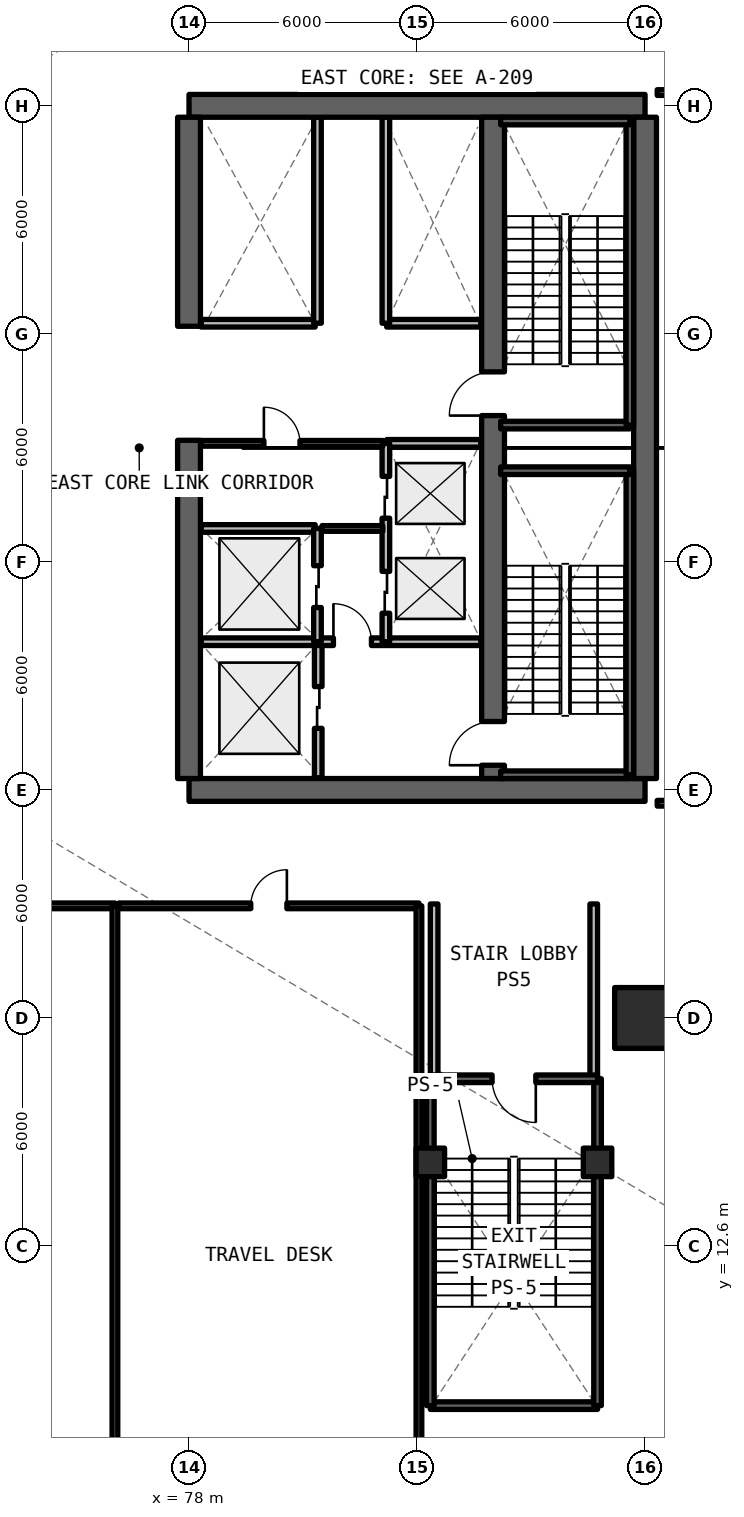
"""IFC4 building model, lengths in metres.
Left out: names, types, materials, properties, quantities, classifications, styles, units other than length and angle.
Written with IfcOpenShell. Run it as: python <this file> out.ifc"""

import sys

from ifc_helpers import new_model, si_unit, direction, frame, frame_2d, origin, origin_2d, place, context, subcontext, project, spatial, rectangle, extrude, element, fill, save


model = new_model("IFC4")
c1 = context("Model", 3, precision=1e-05, world=origin(), true_north=direction((0.0, 1.0)))
c2 = subcontext(c1, "Body", "Model", "MODEL_VIEW")
j1 = project(units=[si_unit("LENGTHUNIT", "METRE"), si_unit("PLANEANGLEUNIT", "RADIAN")], contexts=[c1])
p1 = place(None, origin())
s1 = spatial("IfcSite", under=j1, at=p1, CompositionType="ELEMENT")
p2 = place(p1, origin())
s2 = spatial("IfcBuilding", under=s1, at=p2, CompositionType="ELEMENT")
p3 = place(p2, frame((0.0, 0.0, 19.47)))
s3 = spatial("IfcBuildingStorey", under=s2, at=p3, CompositionType="ELEMENT", Elevation=19.47)
for number, where, z_axis, x_axis in (
    (1, (78.0, 24.6, 0.0), (0.0, 0.0, 1.0), (1.0, 0.0, 0.0)),
    (2, (90.0, 42.6, 0.0), (0.0, 0.0, 1.0), (-1.0, 0.0, 0.0)),
):
    element("IfcWall", number, at=place(p3, frame(where, z_axis=z_axis, x_axis=x_axis)), inside=s3, PredefinedType="SHEAR", context=c2, shape_type="SweptSolid", body=[
        extrude(rectangle(XDim=12.0, YDim=0.6, at=frame_2d((6.0, 0.0))), origin(), (0.0, 0.0, 1.0), 4.62),
    ])
p4 = place(p3, frame((90.0, 24.9, 0.0), z_axis=(0.0, 0.0, 1.0), x_axis=(0.0, 1.0, 0.0)))
e3 = element("IfcWall", 3, at=p4, inside=s3, PredefinedType="SHEAR", context=c2, shape_type="SweptSolid", body=[
    extrude(rectangle(XDim=17.4, YDim=0.6, at=frame_2d((8.7, 0.0))), origin(), (0.0, 0.0, 1.0), 4.62),
])
p5 = place(p3, frame((78.0, 24.9, 0.0), z_axis=(0.0, 0.0, 1.0), x_axis=(0.0, 1.0, 0.0)))
e4 = element("IfcWall", 4, at=p5, inside=s3, PredefinedType="SHEAR", context=c2, shape_type="SweptSolid", body=[
    extrude(rectangle(XDim=8.9, YDim=0.6, at=frame_2d((4.45, 0.0))), origin(), (0.0, 0.0, 1.0), 4.62),
])
p6 = place(p3, frame((78.0, 36.8, 0.0), z_axis=(0.0, 0.0, 1.0), x_axis=(0.0, 1.0, 0.0)))
e5 = element("IfcWall", 5, at=p6, inside=s3, PredefinedType="SHEAR", context=c2, shape_type="SweptSolid", body=[
    extrude(rectangle(XDim=5.5, YDim=0.6, at=frame_2d((2.75, 0.0))), origin(), (0.0, 0.0, 1.0), 4.62),
])
p7 = place(p3, frame((86.0, 24.9, 0.0), z_axis=(0.0, 0.0, 1.0), x_axis=(0.0, 1.0, 0.0)))
e6 = element("IfcWall", 6, at=p7, inside=s3, PredefinedType="SHEAR", context=c2, shape_type="SweptSolid", body=[
    extrude(rectangle(XDim=17.4, YDim=0.6, at=frame_2d((8.7, 0.0))), origin(), (0.0, 0.0, 1.0), 4.62),
])
p8 = place(p7, frame((0.35, 0.0, 0.0)))
e7 = element("IfcOpeningElement", 7, at=p8, cuts=e6, PredefinedType="OPENING", context=c2, shape_type="SweptSolid", body=[
    extrude(rectangle(XDim=1.15, YDim=2.15, at=frame_2d((0.575, 1.075))), frame((0.0, 0.31, 0.0), z_axis=(0.0, -1.0, 0.0), x_axis=(1.0, 0.0, 0.0)), (0.0, 0.0, 1.0), 0.62),
])
p9 = place(p7, frame((9.55, 0.0, 0.0)))
e8 = element("IfcOpeningElement", 8, at=p9, cuts=e6, PredefinedType="OPENING", context=c2, shape_type="SweptSolid", body=[
    extrude(rectangle(XDim=1.15, YDim=2.15, at=frame_2d((0.575, 1.075))), frame((0.0, 0.31, 0.0), z_axis=(0.0, -1.0, 0.0), x_axis=(1.0, 0.0, 0.0)), (0.0, 0.0, 1.0), 0.62),
])
p10 = place(p3, frame((90.0, 18.6, 0.0), z_axis=(0.0, 0.0, 1.0), x_axis=(1.0, 0.0, 0.0)))
e9 = element("IfcColumn", 9, at=p10, inside=s3, PredefinedType="COLUMN", context=c2, shape_type="SweptSolid", body=[
    extrude(rectangle(XDim=1.6, YDim=1.6, at=origin_2d()), origin(), (0.0, 0.0, 1.0), 4.62),
])
for number, where, z_axis, x_axis in (
    (10, (84.35, 14.8, 0.0), (0.0, 0.0, 1.0), (1.0, 0.0, 0.0)),
    (11, (88.75, 14.8, 0.0), (0.0, 0.0, 1.0), (1.0, 0.0, 0.0)),
):
    element("IfcColumn", number, at=place(p3, frame(where, z_axis=z_axis, x_axis=x_axis)), inside=s3, PredefinedType="COLUMN", context=c2, shape_type="SweptSolid", body=[
        extrude(rectangle(XDim=0.75, YDim=0.75, at=origin_2d()), origin(), (0.0, 0.0, 1.0), 4.27),
    ])
p11 = place(p3, frame((81.4, 24.92, 0.0), z_axis=(0.0, 0.0, 1.0), x_axis=(0.0, 1.0, 0.0)))
e12 = element("IfcWall", 12, at=p11, inside=s3, PredefinedType="SOLIDWALL", context=c2, shape_type="SweptSolid", body=[
    extrude(rectangle(XDim=3.58, YDim=0.2, at=frame_2d((1.79, 0.0))), origin(), (0.0, 0.0, 1.0), 3.49),
])
p12 = place(p11, frame((1.3, 0.0, 0.0)))
e13 = element("IfcOpeningElement", 13, at=p12, cuts=e12, PredefinedType="OPENING", context=c2, shape_type="SweptSolid", body=[
    extrude(rectangle(XDim=1.1, YDim=2.2, at=frame_2d((0.55, 1.1))), frame((0.0, 0.11, 0.0), z_axis=(0.0, -1.0, 0.0), x_axis=(1.0, 0.0, 0.0)), (0.0, 0.0, 1.0), 0.22),
])
p13 = place(p3, frame((78.32, 28.5, 0.0), z_axis=(0.0, 0.0, 1.0), x_axis=(1.0, 0.0, 0.0)))
e14 = element("IfcWall", 14, at=p13, inside=s3, PredefinedType="SOLIDWALL", context=c2, shape_type="SweptSolid", body=[
    extrude(rectangle(XDim=7.36, YDim=0.2, at=frame_2d((3.68, 0.0))), origin(), (0.0, 0.0, 1.0), 3.49),
])
p14 = place(p13, frame((3.48, 0.0, 0.0)))
e15 = element("IfcOpeningElement", 15, at=p14, cuts=e14, PredefinedType="OPENING", context=c2, shape_type="SweptSolid", body=[
    extrude(rectangle(XDim=1.0, YDim=2.15, at=frame_2d((0.5, 1.075))), frame((0.0, 0.11, 0.0), z_axis=(0.0, -1.0, 0.0), x_axis=(1.0, 0.0, 0.0)), (0.0, 0.0, 1.0), 0.22),
])
p15 = place(p3, frame((83.2, 33.72, 0.0), z_axis=(0.0, 0.0, 1.0), x_axis=(1.0, 0.0, 0.0)))
e16 = element("IfcWall", 16, at=p15, inside=s3, PredefinedType="SOLIDWALL", context=c2, shape_type="SweptSolid", body=[
    extrude(rectangle(XDim=2.48, YDim=0.2, at=frame_2d((1.24, 0.0))), origin(), (0.0, 0.0, 1.0), 3.49),
])
p16 = place(p3, frame((83.18, 28.5, 0.0), z_axis=(0.0, 0.0, 1.0), x_axis=(0.0, 1.0, 0.0)))
e17 = element("IfcWall", 17, at=p16, inside=s3, PredefinedType="SOLIDWALL", context=c2, shape_type="SweptSolid", body=[
    extrude(rectangle(XDim=5.22, YDim=0.2, at=frame_2d((2.61, 0.0))), origin(), (0.0, 0.0, 1.0), 3.49),
])
p17 = place(p16, frame((0.75, 0.0, 0.0)))
e18 = element("IfcOpeningElement", 18, at=p17, cuts=e17, PredefinedType="OPENING", context=c2, shape_type="SweptSolid", body=[
    extrude(rectangle(XDim=1.1, YDim=2.2, at=frame_2d((0.55, 1.1))), frame((0.0, 0.11, 0.0), z_axis=(0.0, -1.0, 0.0), x_axis=(1.0, 0.0, 0.0)), (0.0, 0.0, 1.0), 0.22),
])
p18 = place(p16, frame((3.25, 0.0, 0.0)))
e19 = element("IfcOpeningElement", 19, at=p18, cuts=e17, PredefinedType="OPENING", context=c2, shape_type="SweptSolid", body=[
    extrude(rectangle(XDim=1.1, YDim=2.2, at=frame_2d((0.55, 1.1))), frame((0.0, 0.11, 0.0), z_axis=(0.0, -1.0, 0.0), x_axis=(1.0, 0.0, 0.0)), (0.0, 0.0, 1.0), 0.22),
])
p19 = place(p3, frame((78.32, 31.48, 0.0), z_axis=(0.0, 0.0, 1.0), x_axis=(1.0, 0.0, 0.0)))
e20 = element("IfcWall", 20, at=p19, inside=s3, PredefinedType="SOLIDWALL", context=c2, shape_type="SweptSolid", body=[
    extrude(rectangle(XDim=3.0, YDim=0.2, at=frame_2d((1.5, 0.0))), origin(), (0.0, 0.0, 1.0), 3.49),
])
p20 = place(p3, frame((81.38, 28.5, 0.0), z_axis=(0.0, 0.0, 1.0), x_axis=(0.0, 1.0, 0.0)))
e21 = element("IfcWall", 21, at=p20, inside=s3, PredefinedType="SOLIDWALL", context=c2, shape_type="SweptSolid", body=[
    extrude(rectangle(XDim=2.98, YDim=0.2, at=frame_2d((1.49, 0.0))), origin(), (0.0, 0.0, 1.0), 3.49),
])
p21 = place(p20, frame((0.9, 0.0, 0.0)))
e22 = element("IfcOpeningElement", 22, at=p21, cuts=e21, PredefinedType="OPENING", context=c2, shape_type="SweptSolid", body=[
    extrude(rectangle(XDim=1.1, YDim=2.2, at=frame_2d((0.55, 1.1))), frame((0.0, 0.11, 0.0), z_axis=(0.0, -1.0, 0.0), x_axis=(1.0, 0.0, 0.0)), (0.0, 0.0, 1.0), 0.22),
])
p22 = place(p3, frame((81.5, 31.48, 0.0), z_axis=(0.0, 0.0, 1.0), x_axis=(1.0, 0.0, 0.0)))
e23 = element("IfcWall", 23, at=p22, inside=s3, PredefinedType="SOLIDWALL", context=c2, shape_type="SweptSolid", body=[
    extrude(rectangle(XDim=1.6, YDim=0.15, at=frame_2d((0.8, 0.0))), origin(), (0.0, 0.0, 1.0), 3.49),
])
p23 = place(p3, frame((78.32, 33.72, 0.0), z_axis=(0.0, 0.0, 1.0), x_axis=(1.0, 0.0, 0.0)))
e24 = element("IfcWall", 24, at=p23, inside=s3, PredefinedType="SOLIDWALL", context=c2, shape_type="SweptSolid", body=[
    extrude(rectangle(XDim=4.78, YDim=0.15, at=frame_2d((2.39, 0.0))), origin(), (0.0, 0.0, 1.0), 3.49),
])
p24 = place(p23, frame((1.65, 0.0, 0.0)))
e25 = element("IfcOpeningElement", 25, at=p24, cuts=e24, PredefinedType="OPENING", context=c2, shape_type="SweptSolid", body=[
    extrude(rectangle(XDim=0.95, YDim=2.15, at=frame_2d((0.475, 1.075))), frame((0.0, 0.085, 0.0), z_axis=(0.0, -1.0, 0.0), x_axis=(1.0, 0.0, 0.0)), (0.0, 0.0, 1.0), 0.17),
])
p25 = place(p3, frame((83.2, 36.88, 0.0), z_axis=(0.0, 0.0, 1.0), x_axis=(1.0, 0.0, 0.0)))
e26 = element("IfcWall", 26, at=p25, inside=s3, PredefinedType="SOLIDWALL", context=c2, shape_type="SweptSolid", body=[
    extrude(rectangle(XDim=2.48, YDim=0.2, at=frame_2d((1.24, 0.0))), origin(), (0.0, 0.0, 1.0), 3.49),
])
p26 = place(p3, frame((83.18, 36.88, 0.0), z_axis=(0.0, 0.0, 1.0), x_axis=(0.0, 1.0, 0.0)))
e27 = element("IfcWall", 27, at=p26, inside=s3, PredefinedType="SOLIDWALL", context=c2, shape_type="SweptSolid", body=[
    extrude(rectangle(XDim=5.42, YDim=0.2, at=frame_2d((2.71, 0.0))), origin(), (0.0, 0.0, 1.0), 3.49),
])
p27 = place(p3, frame((78.32, 36.88, 0.0), z_axis=(0.0, 0.0, 1.0), x_axis=(1.0, 0.0, 0.0)))
e28 = element("IfcWall", 28, at=p27, inside=s3, PredefinedType="SOLIDWALL", context=c2, shape_type="SweptSolid", body=[
    extrude(rectangle(XDim=3.0, YDim=0.2, at=frame_2d((1.5, 0.0))), origin(), (0.0, 0.0, 1.0), 3.49),
])
p28 = place(p3, frame((81.38, 36.88, 0.0), z_axis=(0.0, 0.0, 1.0), x_axis=(0.0, 1.0, 0.0)))
e29 = element("IfcWall", 29, at=p28, inside=s3, PredefinedType="SOLIDWALL", context=c2, shape_type="SweptSolid", body=[
    extrude(rectangle(XDim=5.42, YDim=0.2, at=frame_2d((2.71, 0.0))), origin(), (0.0, 0.0, 1.0), 3.49),
])
for number, where, z_axis, x_axis in (
    (30, (84.45, 17.0, 0.0), (0.0, 0.0, 1.0), (0.0, 1.0, 0.0)),
    (31, (88.65, 17.0, 0.0), (0.0, 0.0, 1.0), (0.0, 1.0, 0.0)),
):
    element("IfcWall", number, at=place(p3, frame(where, z_axis=z_axis, x_axis=x_axis)), inside=s3, PredefinedType="SOLIDWALL", context=c2, shape_type="SweptSolid", body=[
        extrude(rectangle(XDim=4.6, YDim=0.2, at=frame_2d((2.3, 0.0))), origin(), (0.0, 0.0, 1.0), 3.49),
    ])
p29 = place(p3, frame((67.15, 21.55, 0.0), z_axis=(0.0, 0.0, 1.0), x_axis=(1.0, 0.0, 0.0)))
e32 = element("IfcWall", 32, at=p29, inside=s3, PredefinedType="SOLIDWALL", context=c2, shape_type="SweptSolid", body=[
    extrude(rectangle(XDim=8.9, YDim=0.15, at=frame_2d((4.45, 0.0))), origin(), (0.0, 0.0, 1.0), 3.49),
])
p30 = place(p29, frame((3.975, 0.0, 0.0)))
e33 = element("IfcOpeningElement", 33, at=p30, cuts=e32, PredefinedType="OPENING", context=c2, shape_type="SweptSolid", body=[
    extrude(rectangle(XDim=0.95, YDim=2.15, at=frame_2d((0.475, 1.075))), frame((0.0, 0.085, 0.0), z_axis=(0.0, -1.0, 0.0), x_axis=(1.0, 0.0, 0.0)), (0.0, 0.0, 1.0), 0.17),
])
p31 = place(p3, frame((76.05, 4.28, 0.0), z_axis=(0.0, 0.0, 1.0), x_axis=(0.0, 1.0, 0.0)))
e34 = element("IfcWall", 34, at=p31, inside=s3, PredefinedType="SOLIDWALL", context=c2, shape_type="SweptSolid", body=[
    extrude(rectangle(XDim=17.27, YDim=0.15, at=frame_2d((8.635, 0.0))), origin(), (0.0, 0.0, 1.0), 3.49),
])
p32 = place(p3, frame((76.15, 21.55, 0.0), z_axis=(0.0, 0.0, 1.0), x_axis=(1.0, 0.0, 0.0)))
e35 = element("IfcWall", 35, at=p32, inside=s3, PredefinedType="SOLIDWALL", context=c2, shape_type="SweptSolid", body=[
    extrude(rectangle(XDim=7.9, YDim=0.15, at=frame_2d((3.95, 0.0))), origin(), (0.0, 0.0, 1.0), 3.49),
])
p33 = place(p32, frame((3.475, 0.0, 0.0)))
e36 = element("IfcOpeningElement", 36, at=p33, cuts=e35, PredefinedType="OPENING", context=c2, shape_type="SweptSolid", body=[
    extrude(rectangle(XDim=0.95, YDim=2.15, at=frame_2d((0.475, 1.075))), frame((0.0, 0.085, 0.0), z_axis=(0.0, -1.0, 0.0), x_axis=(1.0, 0.0, 0.0)), (0.0, 0.0, 1.0), 0.17),
])
p34 = place(p3, frame((84.05, 4.28, 0.0), z_axis=(0.0, 0.0, 1.0), x_axis=(0.0, 1.0, 0.0)))
e37 = element("IfcWall", 37, at=p34, inside=s3, PredefinedType="SOLIDWALL", context=c2, shape_type="SweptSolid", body=[
    extrude(rectangle(XDim=17.27, YDim=0.15, at=frame_2d((8.635, 0.0))), origin(), (0.0, 0.0, 1.0), 3.49),
])
p35 = place(p3, frame((90.32, 24.25, 0.0), z_axis=(0.0, 0.0, 1.0), x_axis=(1.0, 0.0, 0.0)))
e38 = element("IfcWall", 38, at=p35, inside=s3, PredefinedType="SOLIDWALL", context=c2, shape_type="SweptSolid", body=[
    extrude(rectangle(XDim=13.58, YDim=0.15, at=frame_2d((6.79, 0.0))), origin(), (0.0, 0.0, 1.0), 3.49),
])
p36 = place(p35, frame((6.24, 0.0, 0.0)))
e39 = element("IfcOpeningElement", 39, at=p36, cuts=e38, PredefinedType="OPENING", context=c2, shape_type="SweptSolid", body=[
    extrude(rectangle(XDim=1.1, YDim=2.15, at=frame_2d((0.55, 1.075))), frame((0.0, 0.085, 0.0), z_axis=(0.0, -1.0, 0.0), x_axis=(1.0, 0.0, 0.0)), (0.0, 0.0, 1.0), 0.17),
])
p37 = place(p3, frame((90.32, 42.95, 0.0), z_axis=(0.0, 0.0, 1.0), x_axis=(1.0, 0.0, 0.0)))
e40 = element("IfcWall", 40, at=p37, inside=s3, PredefinedType="SOLIDWALL", context=c2, shape_type="SweptSolid", body=[
    extrude(rectangle(XDim=13.58, YDim=0.15, at=frame_2d((6.79, 0.0))), origin(), (0.0, 0.0, 1.0), 3.49),
])
p38 = place(p3, frame((86.2, 25.0, 0.0), z_axis=(0.0, 0.0, 1.0), x_axis=(1.0, 0.0, 0.0)))
e41 = element("IfcWall", 41, at=p38, inside=s3, PredefinedType="SOLIDWALL", context=c2, shape_type="SweptSolid", body=[
    extrude(rectangle(XDim=3.4, YDim=0.2, at=frame_2d((1.7, 0.0))), origin(), (0.0, 0.0, 1.0), 4.62),
])
p39 = place(p3, frame((89.6, 25.0, 0.0), z_axis=(0.0, 0.0, 1.0), x_axis=(0.0, 1.0, 0.0)))
e42 = element("IfcWall", 42, at=p39, inside=s3, PredefinedType="SOLIDWALL", context=c2, shape_type="SweptSolid", body=[
    extrude(rectangle(XDim=8.0, YDim=0.2, at=frame_2d((4.0, 0.0))), origin(), (0.0, 0.0, 1.0), 4.62),
])
for number, where, z_axis, x_axis in (
    (43, (89.6, 33.0, 0.0), (0.0, 0.0, 1.0), (-1.0, 0.0, 0.0)),
    (44, (86.2, 34.2, 0.0), (0.0, 0.0, 1.0), (1.0, 0.0, 0.0)),
):
    element("IfcWall", number, at=place(p3, frame(where, z_axis=z_axis, x_axis=x_axis)), inside=s3, PredefinedType="SOLIDWALL", context=c2, shape_type="SweptSolid", body=[
        extrude(rectangle(XDim=3.4, YDim=0.2, at=frame_2d((1.7, 0.0))), origin(), (0.0, 0.0, 1.0), 4.62),
    ])
p40 = place(p3, frame((89.6, 34.2, 0.0), z_axis=(0.0, 0.0, 1.0), x_axis=(0.0, 1.0, 0.0)))
e45 = element("IfcWall", 45, at=p40, inside=s3, PredefinedType="SOLIDWALL", context=c2, shape_type="SweptSolid", body=[
    extrude(rectangle(XDim=8.0, YDim=0.2, at=frame_2d((4.0, 0.0))), origin(), (0.0, 0.0, 1.0), 4.62),
])
p41 = place(p3, frame((89.6, 42.2, 0.0), z_axis=(0.0, 0.0, 1.0), x_axis=(-1.0, 0.0, 0.0)))
e46 = element("IfcWall", 46, at=p41, inside=s3, PredefinedType="SOLIDWALL", context=c2, shape_type="SweptSolid", body=[
    extrude(rectangle(XDim=3.4, YDim=0.2, at=frame_2d((1.7, 0.0))), origin(), (0.0, 0.0, 1.0), 4.62),
])
p42 = place(p3, frame((84.35, 8.4, 0.0), z_axis=(0.0, 0.0, 1.0), x_axis=(1.0, 0.0, 0.0)))
e47 = element("IfcWall", 47, at=p42, inside=s3, PredefinedType="SOLIDWALL", context=c2, shape_type="SweptSolid", body=[
    extrude(rectangle(XDim=4.4, YDim=0.2, at=frame_2d((2.2, 0.0))), origin(), (0.0, 0.0, 1.0), 4.62),
])
p43 = place(p3, frame((88.75, 8.4, 0.0), z_axis=(0.0, 0.0, 1.0), x_axis=(0.0, 1.0, 0.0)))
e48 = element("IfcWall", 48, at=p43, inside=s3, PredefinedType="SOLIDWALL", context=c2, shape_type="SweptSolid", body=[
    extrude(rectangle(XDim=8.6, YDim=0.2, at=frame_2d((4.3, 0.0))), origin(), (0.0, 0.0, 1.0), 4.62),
])
p44 = place(p3, frame((88.75, 17.0, 0.0), z_axis=(0.0, 0.0, 1.0), x_axis=(-1.0, 0.0, 0.0)))
e49 = element("IfcWall", 49, at=p44, inside=s3, PredefinedType="SOLIDWALL", context=c2, shape_type="SweptSolid", body=[
    extrude(rectangle(XDim=4.4, YDim=0.2, at=frame_2d((2.2, 0.0))), origin(), (0.0, 0.0, 1.0), 4.62),
])
p45 = place(p44, frame((1.625, 0.0, 0.0)))
e50 = element("IfcOpeningElement", 50, at=p45, cuts=e49, PredefinedType="OPENING", context=c2, shape_type="SweptSolid", body=[
    extrude(rectangle(XDim=1.15, YDim=2.15, at=frame_2d((0.575, 1.075))), frame((0.0, 0.11, 0.0), z_axis=(0.0, -1.0, 0.0), x_axis=(1.0, 0.0, 0.0)), (0.0, 0.0, 1.0), 0.22),
])
p46 = place(p3, frame((84.35, 17.0, 0.0), z_axis=(0.0, 0.0, 1.0), x_axis=(0.0, -1.0, 0.0)))
e51 = element("IfcWall", 51, at=p46, inside=s3, PredefinedType="SOLIDWALL", context=c2, shape_type="SweptSolid", body=[
    extrude(rectangle(XDim=8.6, YDim=0.2, at=frame_2d((4.3, 0.0))), origin(), (0.0, 0.0, 1.0), 4.62),
])
p47 = place(p12, origin())
e52 = element("IfcDoor", 52, at=p47, inside=s3, OperationType="SLIDING_TO_LEFT", PredefinedType="DOOR", context=c2, shape_type="SweptSolid", body=[
    extrude(rectangle(XDim=1.1, YDim=2.2, at=frame_2d((0.55, 1.1))), frame((0.0, 0.025, 0.0), z_axis=(0.0, -1.0, 0.0), x_axis=(1.0, 0.0, 0.0)), (0.0, 0.0, 1.0), 0.05),
])
fill(e13, e52)
p48 = place(p14, origin())
e53 = element("IfcDoor", 53, at=p48, inside=s3, OperationType="SINGLE_SWING_LEFT", PredefinedType="DOOR", context=c2, shape_type="SweptSolid", body=[
    extrude(rectangle(XDim=1.0, YDim=2.15, at=frame_2d((0.5, 1.075))), frame((0.0, 0.025, 0.0), z_axis=(0.0, -1.0, 0.0), x_axis=(1.0, 0.0, 0.0)), (0.0, 0.0, 1.0), 0.05),
])
fill(e15, e53)
p49 = place(p17, origin())
e54 = element("IfcDoor", 54, at=p49, inside=s3, OperationType="SLIDING_TO_LEFT", PredefinedType="DOOR", context=c2, shape_type="SweptSolid", body=[
    extrude(rectangle(XDim=1.1, YDim=2.2, at=frame_2d((0.55, 1.1))), frame((0.0, 0.025, 0.0), z_axis=(0.0, -1.0, 0.0), x_axis=(1.0, 0.0, 0.0)), (0.0, 0.0, 1.0), 0.05),
])
fill(e18, e54)
p50 = place(p18, origin())
e55 = element("IfcDoor", 55, at=p50, inside=s3, OperationType="SLIDING_TO_RIGHT", PredefinedType="DOOR", context=c2, shape_type="SweptSolid", body=[
    extrude(rectangle(XDim=1.1, YDim=2.2, at=frame_2d((0.55, 1.1))), frame((0.0, 0.025, 0.0), z_axis=(0.0, -1.0, 0.0), x_axis=(1.0, 0.0, 0.0)), (0.0, 0.0, 1.0), 0.05),
])
fill(e19, e55)
p51 = place(p21, origin())
e56 = element("IfcDoor", 56, at=p51, inside=s3, OperationType="SLIDING_TO_LEFT", PredefinedType="DOOR", context=c2, shape_type="SweptSolid", body=[
    extrude(rectangle(XDim=1.1, YDim=2.2, at=frame_2d((0.55, 1.1))), frame((0.0, 0.025, 0.0), z_axis=(0.0, -1.0, 0.0), x_axis=(1.0, 0.0, 0.0)), (0.0, 0.0, 1.0), 0.05),
])
fill(e22, e56)
p52 = place(p24, origin())
e57 = element("IfcDoor", 57, at=p52, inside=s3, OperationType="SINGLE_SWING_LEFT", PredefinedType="DOOR", context=c2, shape_type="SweptSolid", body=[
    extrude(rectangle(XDim=0.95, YDim=2.15, at=frame_2d((0.475, 1.075))), frame((0.0, 0.025, 0.0), z_axis=(0.0, -1.0, 0.0), x_axis=(1.0, 0.0, 0.0)), (0.0, 0.0, 1.0), 0.05),
])
fill(e25, e57)
p53 = place(p33, origin())
e58 = element("IfcDoor", 58, at=p53, inside=s3, OperationType="SINGLE_SWING_RIGHT", PredefinedType="DOOR", context=c2, shape_type="SweptSolid", body=[
    extrude(rectangle(XDim=0.95, YDim=2.15, at=frame_2d((0.475, 1.075))), frame((0.0, 0.025, 0.0), z_axis=(0.0, -1.0, 0.0), x_axis=(1.0, 0.0, 0.0)), (0.0, 0.0, 1.0), 0.05),
])
fill(e36, e58)
p54 = place(p8, origin())
e59 = element("IfcDoor", 59, at=p54, inside=s3, OperationType="SINGLE_SWING_RIGHT", PredefinedType="DOOR", context=c2, shape_type="SweptSolid", body=[
    extrude(rectangle(XDim=1.15, YDim=2.15, at=frame_2d((0.575, 1.075))), frame((0.0, 0.025, 0.0), z_axis=(0.0, -1.0, 0.0), x_axis=(1.0, 0.0, 0.0)), (0.0, 0.0, 1.0), 0.05),
])
fill(e7, e59)
p55 = place(p9, origin())
e60 = element("IfcDoor", 60, at=p55, inside=s3, OperationType="SINGLE_SWING_LEFT", PredefinedType="DOOR", context=c2, shape_type="SweptSolid", body=[
    extrude(rectangle(XDim=1.15, YDim=2.15, at=frame_2d((0.575, 1.075))), frame((0.0, 0.025, 0.0), z_axis=(0.0, -1.0, 0.0), x_axis=(1.0, 0.0, 0.0)), (0.0, 0.0, 1.0), 0.05),
])
fill(e8, e60)
p56 = place(p45, origin())
e61 = element("IfcDoor", 61, at=p56, inside=s3, OperationType="SINGLE_SWING_RIGHT", PredefinedType="DOOR", context=c2, shape_type="SweptSolid", body=[
    extrude(rectangle(XDim=1.15, YDim=2.15, at=frame_2d((0.575, 1.075))), frame((0.0, 0.025, 0.0), z_axis=(0.0, -1.0, 0.0), x_axis=(1.0, 0.0, 0.0)), (0.0, 0.0, 1.0), 0.05),
])
fill(e50, e61)
save(model, sys.argv[1])
